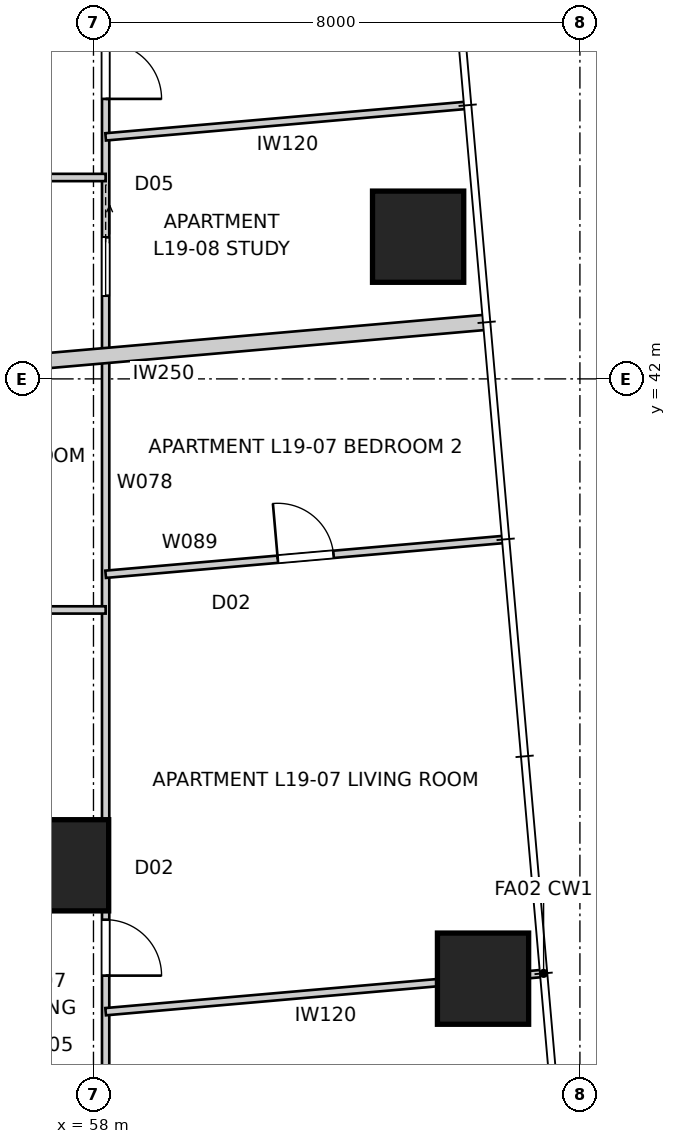
"""IFC4 building model, lengths in metres.
Left out: names, types, materials, properties, quantities, classifications, styles, units other than length and angle.
Written with IfcOpenShell. Run it as: python <this file> out.ifc"""

import sys

from ifc_helpers import new_model, si_unit, direction, frame, frame_2d, origin, origin_2d, place, context, subcontext, project, spatial, rectangle, extrude, element, fill, save


model = new_model("IFC4")
c1 = context("Model", 3, precision=1e-05, world=origin(), true_north=direction((0.0, 1.0)))
c2 = subcontext(c1, "Body", "Model", "MODEL_VIEW")
j1 = project(units=[si_unit("LENGTHUNIT", "METRE"), si_unit("PLANEANGLEUNIT", "RADIAN")], contexts=[c1])
p1 = place(None, origin())
s1 = spatial("IfcSite", under=j1, at=p1, CompositionType="ELEMENT")
p2 = place(p1, origin())
s2 = spatial("IfcBuilding", under=s1, at=p2, CompositionType="ELEMENT")
p3 = place(p2, frame((0.0, 0.0, 71.0)))
s3 = spatial("IfcBuildingStorey", under=s2, at=p3, CompositionType="ELEMENT", Elevation=71.0)
for number, where, z_axis, x_axis in (
    (1, (64.407, 32.135, 0.0), (0.0, 0.0, 1.0), (1.0, 0.0, 0.0)),
    (2, (63.339, 44.339, 0.0), (0.0, 0.0, 1.0), (1.0, 0.0, 0.0)),
):
    element("IfcColumn", number, at=place(p3, frame(where, z_axis=z_axis, x_axis=x_axis)), inside=s3, PredefinedType="COLUMN", context=c2, shape_type="SweptSolid", body=[
        extrude(rectangle(XDim=1.5, YDim=1.5, at=origin_2d()), origin(), (0.0, 0.0, 1.0), 3.2),
    ])
p4 = place(p3, frame((57.5, 34.0, 0.0), z_axis=(0.0, 0.0, 1.0), x_axis=(1.0, 0.0, 0.0)))
e3 = element("IfcColumn", 3, at=p4, inside=s3, PredefinedType="COLUMN", context=c2, shape_type="SweptSolid", body=[
    extrude(rectangle(XDim=1.5, YDim=1.5, at=origin_2d()), origin(), (0.0, 0.0, 1.0), 3.4),
])
p5 = place(p3, frame((64.466, 42.932, 0.0), z_axis=(0.0, 0.0, 1.0), x_axis=(-0.996193939644, -0.08716441141, 0.0)))
e4 = element("IfcWall", 4, at=p5, inside=s3, PredefinedType="PARTITIONING", context=c2, shape_type="SweptSolid", body=[
    extrude(rectangle(XDim=10.736, YDim=0.25, at=frame_2d((5.368, 0.0))), origin(), (0.0, 0.0, 1.0), 3.2),
])
p6 = place(p3, frame((58.2, 48.2, 0.0), z_axis=(0.0, 0.0, 1.0), x_axis=(0.0, -1.0, 0.0)))
e5 = element("IfcWall", 5, at=p6, inside=s3, PredefinedType="PARTITIONING", context=c2, shape_type="SweptSolid", body=[
    extrude(rectangle(XDim=20.7, YDim=0.12, at=frame_2d((10.35, 0.0))), origin(), (0.0, 0.0, 1.0), 3.2),
])
p7 = place(p6, frame((15.095, 0.0, 0.0)))
e6 = element("IfcOpeningElement", 6, at=p7, cuts=e5, PredefinedType="OPENING", context=c2, shape_type="SweptSolid", body=[
    extrude(rectangle(XDim=0.92, YDim=2.34, at=frame_2d((0.46, 1.17))), frame((0.0, 0.07, 0.0), z_axis=(0.0, -1.0, 0.0), x_axis=(1.0, 0.0, 0.0)), (0.0, 0.0, 1.0), 0.14),
])
p8 = place(p6, frame((18.521, 0.0, 0.0)))
e7 = element("IfcOpeningElement", 7, at=p8, cuts=e5, PredefinedType="OPENING", context=c2, shape_type="SweptSolid", body=[
    extrude(rectangle(XDim=0.96, YDim=2.1, at=frame_2d((0.48, 1.05))), frame((0.0, 0.07, 0.0), z_axis=(0.0, -1.0, 0.0), x_axis=(1.0, 0.0, 0.0)), (0.0, 0.0, 1.0), 0.14),
])
p9 = place(p6, frame((0.675, 0.0, 0.0)))
e8 = element("IfcOpeningElement", 8, at=p9, cuts=e5, PredefinedType="OPENING", context=c2, shape_type="SweptSolid", body=[
    extrude(rectangle(XDim=0.92, YDim=2.34, at=frame_2d((0.46, 1.17))), frame((0.0, 0.07, 0.0), z_axis=(0.0, -1.0, 0.0), x_axis=(1.0, 0.0, 0.0)), (0.0, 0.0, 1.0), 0.14),
])
p10 = place(p6, frame((3.872, 0.0, 0.0)))
e9 = element("IfcOpeningElement", 9, at=p10, cuts=e5, PredefinedType="OPENING", context=c2, shape_type="SweptSolid", body=[
    extrude(rectangle(XDim=0.96, YDim=2.1, at=frame_2d((0.48, 1.05))), frame((0.0, 0.07, 0.0), z_axis=(0.0, -1.0, 0.0), x_axis=(1.0, 0.0, 0.0)), (0.0, 0.0, 1.0), 0.14),
])
p11 = place(p3, frame((53.8, 34.648, 0.0), z_axis=(0.0, 0.0, 1.0), x_axis=(1.0, 0.0, 0.0)))
e10 = element("IfcWall", 10, at=p11, inside=s3, PredefinedType="PARTITIONING", context=c2, shape_type="SweptSolid", body=[
    extrude(rectangle(XDim=4.4, YDim=0.12, at=frame_2d((2.2, 0.0))), origin(), (0.0, 0.0, 1.0), 3.2),
])
p12 = place(p11, frame((1.72, 0.0, 0.0)))
e11 = element("IfcOpeningElement", 11, at=p12, cuts=e10, PredefinedType="OPENING", context=c2, shape_type="SweptSolid", body=[
    extrude(rectangle(XDim=0.96, YDim=2.1, at=frame_2d((0.48, 1.05))), frame((0.0, 0.07, 0.0), z_axis=(0.0, -1.0, 0.0), x_axis=(1.0, 0.0, 0.0)), (0.0, 0.0, 1.0), 0.14),
])
p13 = place(p3, frame((58.2, 38.2, 0.0), z_axis=(0.0, 0.0, 1.0), x_axis=(-1.0, 0.0, 0.0)))
e12 = element("IfcWall", 12, at=p13, inside=s3, PredefinedType="PARTITIONING", context=c2, shape_type="SweptSolid", body=[
    extrude(rectangle(XDim=4.4, YDim=0.12, at=frame_2d((2.2, 0.0))), origin(), (0.0, 0.0, 1.0), 3.2),
])
p14 = place(p13, frame((3.07, 0.0, 0.0)))
e13 = element("IfcOpeningElement", 13, at=p14, cuts=e12, PredefinedType="OPENING", context=c2, shape_type="SweptSolid", body=[
    extrude(rectangle(XDim=0.96, YDim=2.1, at=frame_2d((0.48, 1.05))), frame((0.0, 0.07, 0.0), z_axis=(0.0, -1.0, 0.0), x_axis=(1.0, 0.0, 0.0)), (0.0, 0.0, 1.0), 0.14),
])
p15 = place(p3, frame((65.363, 32.219, 0.0), z_axis=(0.0, 0.0, 1.0), x_axis=(-0.996194454549, -0.087158526409, 0.0)))
e14 = element("IfcWall", 14, at=p15, inside=s3, PredefinedType="PARTITIONING", context=c2, shape_type="SweptSolid", body=[
    extrude(rectangle(XDim=7.19, YDim=0.12, at=frame_2d((3.595, 0.0))), origin(), (0.0, 0.0, 1.0), 3.2),
])
p16 = place(p3, frame((58.2, 38.786, 0.0), z_axis=(0.0, 0.0, 1.0), x_axis=(0.996195090105, 0.087151261897, 0.0)))
e15 = element("IfcWall", 15, at=p16, inside=s3, PredefinedType="PARTITIONING", context=c2, shape_type="SweptSolid", body=[
    extrude(rectangle(XDim=6.563, YDim=0.12, at=frame_2d((3.282, 0.0))), origin(), (0.0, 0.0, 1.0), 3.2),
])
p17 = place(p16, frame((2.842, 0.0, 0.0)))
e16 = element("IfcOpeningElement", 16, at=p17, cuts=e15, PredefinedType="OPENING", context=c2, shape_type="SweptSolid", body=[
    extrude(rectangle(XDim=0.92, YDim=2.34, at=frame_2d((0.46, 1.17))), frame((0.0, 0.07, 0.0), z_axis=(0.0, -1.0, 0.0), x_axis=(1.0, 0.0, 0.0)), (0.0, 0.0, 1.0), 0.14),
])
p18 = place(p3, frame((53.002, 45.312, 0.0), z_axis=(0.0, 0.0, 1.0), x_axis=(1.0, 0.0, 0.0)))
e17 = element("IfcWall", 17, at=p18, inside=s3, PredefinedType="PARTITIONING", context=c2, shape_type="SweptSolid", body=[
    extrude(rectangle(XDim=5.198, YDim=0.12, at=frame_2d((2.599, 0.0))), origin(), (0.0, 0.0, 1.0), 3.2),
])
p19 = place(p18, frame((2.518, 0.0, 0.0)))
e18 = element("IfcOpeningElement", 18, at=p19, cuts=e17, PredefinedType="OPENING", context=c2, shape_type="SweptSolid", body=[
    extrude(rectangle(XDim=0.96, YDim=2.1, at=frame_2d((0.48, 1.05))), frame((0.0, 0.07, 0.0), z_axis=(0.0, -1.0, 0.0), x_axis=(1.0, 0.0, 0.0)), (0.0, 0.0, 1.0), 0.14),
])
p20 = place(p3, frame((64.114, 46.498, 0.0), z_axis=(0.0, 0.0, 1.0), x_axis=(-0.996195547509, -0.087146033323, 0.0)))
e19 = element("IfcWall", 19, at=p20, inside=s3, PredefinedType="PARTITIONING", context=c2, shape_type="SweptSolid", body=[
    extrude(rectangle(XDim=5.937, YDim=0.12, at=frame_2d((2.968, 0.0))), origin(), (0.0, 0.0, 1.0), 2.399),
])
p21 = place(p7, origin())
e20 = element("IfcDoor", 20, at=p21, inside=s3, OperationType="SINGLE_SWING_RIGHT", PredefinedType="DOOR", context=c2, shape_type="SweptSolid", body=[
    extrude(rectangle(XDim=0.92, YDim=2.34, at=frame_2d((0.46, 1.17))), frame((0.0, 0.025, 0.0), z_axis=(0.0, -1.0, 0.0), x_axis=(1.0, 0.0, 0.0)), (0.0, 0.0, 1.0), 0.05),
])
fill(e6, e20)
p22 = place(p17, origin())
e21 = element("IfcDoor", 21, at=p22, inside=s3, OperationType="SINGLE_SWING_LEFT", PredefinedType="DOOR", context=c2, shape_type="SweptSolid", body=[
    extrude(rectangle(XDim=0.92, YDim=2.34, at=frame_2d((0.46, 1.17))), frame((0.0, 0.025, 0.0), z_axis=(0.0, -1.0, 0.0), x_axis=(1.0, 0.0, 0.0)), (0.0, 0.0, 1.0), 0.05),
])
fill(e16, e21)
p23 = place(p9, origin())
e22 = element("IfcDoor", 22, at=p23, inside=s3, OperationType="SINGLE_SWING_RIGHT", PredefinedType="DOOR", context=c2, shape_type="SweptSolid", body=[
    extrude(rectangle(XDim=0.92, YDim=2.34, at=frame_2d((0.46, 1.17))), frame((0.0, 0.025, 0.0), z_axis=(0.0, -1.0, 0.0), x_axis=(1.0, 0.0, 0.0)), (0.0, 0.0, 1.0), 0.05),
])
fill(e8, e22)
p24 = place(p10, origin())
e23 = element("IfcDoor", 23, at=p24, inside=s3, OperationType="SLIDING_TO_LEFT", PredefinedType="DOOR", context=c2, shape_type="SweptSolid", body=[
    extrude(rectangle(XDim=0.96, YDim=2.1, at=frame_2d((0.48, 1.05))), frame((0.0, 0.025, 0.0), z_axis=(0.0, -1.0, 0.0), x_axis=(1.0, 0.0, 0.0)), (0.0, 0.0, 1.0), 0.05),
])
fill(e9, e23)
save(model, sys.argv[1])
